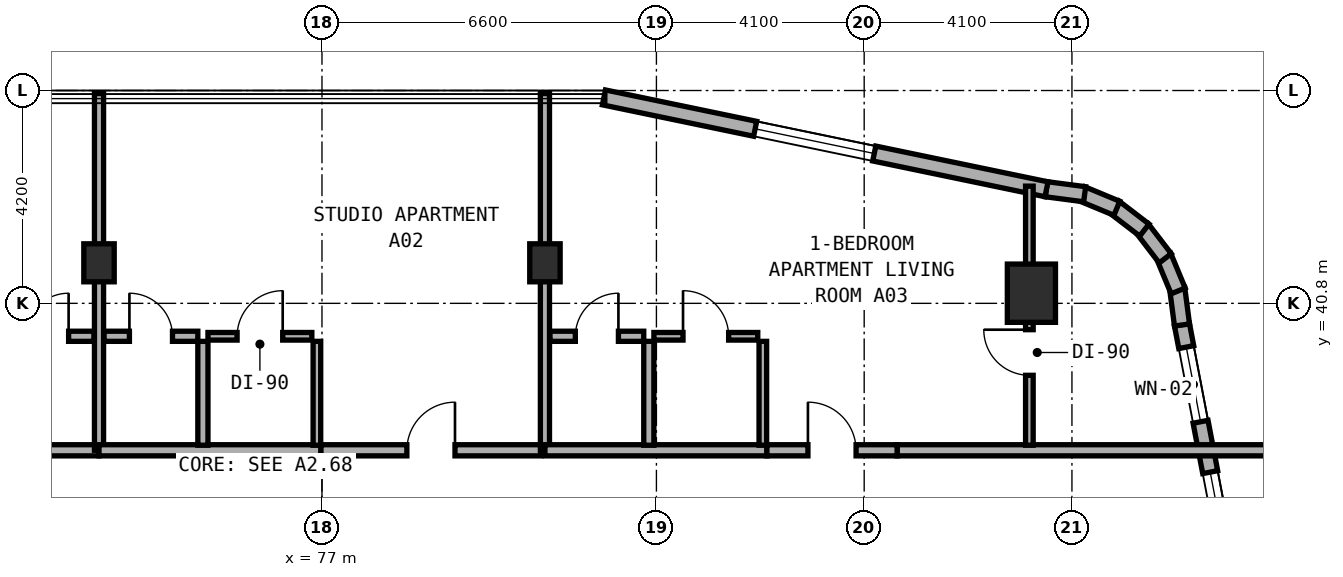
"""IFC4 building model, lengths in metres.
Left out: names, types, materials, properties, quantities, classifications, styles, units other than length and angle.
Written with IfcOpenShell. Run it as: python <this file> out.ifc"""

import sys

from ifc_helpers import new_model, si_unit, direction, frame, frame_2d, origin, origin_2d, place, context, subcontext, project, spatial, rectangle, extrude, element, fill, save


model = new_model("IFC4")
c1 = context("Model", 3, precision=1e-05, world=origin(), true_north=direction((0.0, 1.0)))
c2 = subcontext(c1, "Body", "Model", "MODEL_VIEW")
j1 = project(units=[si_unit("LENGTHUNIT", "METRE"), si_unit("PLANEANGLEUNIT", "RADIAN")], contexts=[c1])
p1 = place(None, origin())
s1 = spatial("IfcSite", under=j1, at=p1, CompositionType="ELEMENT")
p2 = place(p1, origin())
s2 = spatial("IfcBuilding", under=s1, at=p2, CompositionType="ELEMENT")
p3 = place(p2, frame((0.0, 0.0, 73.0)))
s3 = spatial("IfcBuildingStorey", under=s2, at=p3, CompositionType="ELEMENT", Elevation=73.0)
for number, where, z_axis, x_axis in (
    (1, (72.6, 41.6, 0.0), (0.0, 0.0, 1.0), (1.0, 0.0, 0.0)),
    (2, (81.4, 41.6, 0.0), (0.0, 0.0, 1.0), (1.0, 0.0, 0.0)),
):
    element("IfcColumn", number, at=place(p3, frame(where, z_axis=z_axis, x_axis=x_axis)), inside=s3, PredefinedType="COLUMN", context=c2, shape_type="SweptSolid", body=[
        extrude(rectangle(XDim=0.6, YDim=0.75, at=origin_2d()), origin(), (0.0, 0.0, 1.0), 3.5),
    ])
p4 = place(p3, frame((91.0, 41.0, 0.0), z_axis=(0.0, 0.0, 1.0), x_axis=(1.0, 0.0, 0.0)))
e3 = element("IfcColumn", 3, at=p4, inside=s3, PredefinedType="COLUMN", context=c2, shape_type="SweptSolid", body=[
    extrude(rectangle(XDim=0.95, YDim=1.15, at=origin_2d()), origin(), (0.0, 0.0, 1.0), 3.5),
])
p5 = place(p3, frame((95.783, 30.918, 0.0), z_axis=(0.0, 0.0, 1.0), x_axis=(-0.188087874316, 0.982152203854, 0.0)))
e4 = element("IfcWall", 4, at=p5, inside=s3, PredefinedType="STANDARD", context=c2, shape_type="SweptSolid", body=[
    extrude(rectangle(XDim=9.634, YDim=0.3, at=frame_2d((4.817, 0.0))), origin(), (0.0, 0.0, 1.0), 3.25),
])
p6 = place(p5, frame((1.897, 0.0, 0.8)))
e5 = element("IfcOpeningElement", 5, at=p6, cuts=e4, PredefinedType="OPENING", context=c2, shape_type="SweptSolid", body=[
    extrude(rectangle(XDim=2.4, YDim=1.6, at=frame_2d((1.2, 0.8))), frame((0.0, 0.16, 0.0), z_axis=(0.0, -1.0, 0.0), x_axis=(1.0, 0.0, 0.0)), (0.0, 0.0, 1.0), 0.32),
])
p7 = place(p5, frame((5.47, 0.0, 0.85)))
e6 = element("IfcOpeningElement", 6, at=p7, cuts=e4, PredefinedType="OPENING", context=c2, shape_type="SweptSolid", body=[
    extrude(rectangle(XDim=1.2, YDim=1.5, at=frame_2d((0.6, 0.75))), frame((0.0, 0.16, 0.0), z_axis=(0.0, -1.0, 0.0), x_axis=(1.0, 0.0, 0.0)), (0.0, 0.0, 1.0), 0.32),
])
p8 = place(p5, frame((7.682, 0.0, 0.85)))
e7 = element("IfcOpeningElement", 7, at=p8, cuts=e4, PredefinedType="OPENING", context=c2, shape_type="SweptSolid", body=[
    extrude(rectangle(XDim=1.5, YDim=1.5, at=frame_2d((0.75, 0.75))), frame((0.0, 0.16, 0.0), z_axis=(0.0, -1.0, 0.0), x_axis=(1.0, 0.0, 0.0)), (0.0, 0.0, 1.0), 0.32),
])
p9 = place(p3, frame((93.972, 40.373, 0.0), z_axis=(0.0, 0.0, 1.0), x_axis=(-0.130255288807, 0.991480488834, 0.0)))
e8 = element("IfcWall", 8, at=p9, inside=s3, PredefinedType="STANDARD", context=c2, shape_type="SweptSolid", body=[
    extrude(rectangle(XDim=0.729, YDim=0.3, at=frame_2d((0.365, 0.0))), origin(), (0.0, 0.0, 1.0), 3.25),
])
p10 = place(p3, frame((93.896, 41.045, 0.0), z_axis=(0.0, 0.0, 1.0), x_axis=(-0.383267045233, 0.923637576129, 0.0)))
e9 = element("IfcWall", 9, at=p10, inside=s3, PredefinedType="STANDARD", context=c2, shape_type="SweptSolid", body=[
    extrude(rectangle(XDim=0.746, YDim=0.3, at=frame_2d((0.373, 0.0))), origin(), (0.0, 0.0, 1.0), 3.25),
])
for number, where, z_axis, x_axis in (
    (10, (93.641, 41.689, 0.0), (0.0, 0.0, 1.0), (-0.609, 0.793, 0.0)),
    (11, (93.229, 42.246, 0.0), (0.0, 0.0, 1.0), (-0.794, 0.608, 0.0)),
):
    element("IfcWall", number, at=place(p3, frame(where, z_axis=z_axis, x_axis=x_axis)), inside=s3, PredefinedType="STANDARD", context=c2, shape_type="SweptSolid", body=[
        extrude(rectangle(XDim=0.746, YDim=0.3, at=frame_2d((0.373, 0.0))), origin(), (0.0, 0.0, 1.0), 3.25),
    ])
p11 = place(p3, frame((92.686, 42.676, 0.0), z_axis=(0.0, 0.0, 1.0), x_axis=(-0.923637576129, 0.383267045233, 0.0)))
e12 = element("IfcWall", 12, at=p11, inside=s3, PredefinedType="STANDARD", context=c2, shape_type="SweptSolid", body=[
    extrude(rectangle(XDim=0.746, YDim=0.3, at=frame_2d((0.373, 0.0))), origin(), (0.0, 0.0, 1.0), 3.25),
])
p12 = place(p3, frame((92.051, 42.953, 0.0), z_axis=(0.0, 0.0, 1.0), x_axis=(-0.991559404866, 0.129653178221, 0.0)))
e13 = element("IfcWall", 13, at=p12, inside=s3, PredefinedType="STANDARD", context=c2, shape_type="SweptSolid", body=[
    extrude(rectangle(XDim=0.764, YDim=0.3, at=frame_2d((0.382, 0.0))), origin(), (0.0, 0.0, 1.0), 3.25),
])
p13 = place(p3, frame((91.298, 43.051, 0.0), z_axis=(0.0, 0.0, 1.0), x_axis=(-0.979128391325, 0.203242695569, 0.0)))
e14 = element("IfcWall", 14, at=p13, inside=s3, PredefinedType="STANDARD", context=c2, shape_type="SweptSolid", body=[
    extrude(rectangle(XDim=8.92, YDim=0.3, at=frame_2d((4.46, 0.0))), origin(), (0.0, 0.0, 1.0), 3.25),
])
p14 = place(p13, frame((3.472, 0.0, 0.8)))
e15 = element("IfcOpeningElement", 15, at=p14, cuts=e14, PredefinedType="OPENING", context=c2, shape_type="SweptSolid", body=[
    extrude(rectangle(XDim=2.4, YDim=1.6, at=frame_2d((1.2, 0.8))), frame((0.0, 0.16, 0.0), z_axis=(0.0, -1.0, 0.0), x_axis=(1.0, 0.0, 0.0)), (0.0, 0.0, 1.0), 0.32),
])
p15 = place(p3, frame((68.22, 37.9, 0.0), z_axis=(0.0, 0.0, 1.0), x_axis=(1.0, 0.0, 0.0)))
e16 = element("IfcWall", 16, at=p15, inside=s3, PredefinedType="SOLIDWALL", context=c2, shape_type="SweptSolid", body=[
    extrude(rectangle(XDim=4.38, YDim=0.22, at=frame_2d((2.19, 0.0))), origin(), (0.0, 0.0, 1.0), 2.725),
])
p16 = place(p3, frame((70.65, 40.15, 0.0), z_axis=(0.0, 0.0, 1.0), x_axis=(1.0, 0.0, 0.0)))
e17 = element("IfcWall", 17, at=p16, inside=s3, PredefinedType="PLUMBINGWALL", context=c2, shape_type="SweptSolid", body=[
    extrude(rectangle(XDim=1.85, YDim=0.2, at=frame_2d((0.925, 0.0))), origin(), (0.0, 0.0, 1.0), 3.22),
])
p17 = place(p16, frame((0.5, 0.0, 0.0)))
e18 = element("IfcOpeningElement", 18, at=p17, cuts=e17, PredefinedType="OPENING", context=c2, shape_type="SweptSolid", body=[
    extrude(rectangle(XDim=0.85, YDim=2.1, at=frame_2d((0.425, 1.05))), frame((0.0, 0.11, 0.0), z_axis=(0.0, -1.0, 0.0), x_axis=(1.0, 0.0, 0.0)), (0.0, 0.0, 1.0), 0.22),
])
p18 = place(p3, frame((72.6, 37.9, 0.0), z_axis=(0.0, 0.0, 1.0), x_axis=(0.0, 1.0, 0.0)))
e19 = element("IfcWall", 19, at=p18, inside=s3, PredefinedType="SOLIDWALL", context=c2, shape_type="SweptSolid", body=[
    extrude(rectangle(XDim=7.04, YDim=0.18, at=frame_2d((3.52, 0.0))), origin(), (0.0, 0.0, 1.0), 2.725),
])
p19 = place(p3, frame((72.6, 37.9, 0.0), z_axis=(0.0, 0.0, 1.0), x_axis=(1.0, 0.0, 0.0)))
e20 = element("IfcWall", 20, at=p19, inside=s3, PredefinedType="SOLIDWALL", context=c2, shape_type="SweptSolid", body=[
    extrude(rectangle(XDim=4.38, YDim=0.22, at=frame_2d((2.19, 0.0))), origin(), (0.0, 0.0, 1.0), 2.725),
])
p20 = place(p3, frame((76.98, 37.9, 0.0), z_axis=(0.0, 0.0, 1.0), x_axis=(1.0, 0.0, 0.0)))
e21 = element("IfcWall", 21, at=p20, inside=s3, PredefinedType="SOLIDWALL", context=c2, shape_type="SweptSolid", body=[
    extrude(rectangle(XDim=4.34, YDim=0.22, at=frame_2d((2.17, 0.0))), origin(), (0.0, 0.0, 1.0), 2.725),
])
p21 = place(p20, frame((1.695, 0.0, 0.0)))
e22 = element("IfcOpeningElement", 22, at=p21, cuts=e21, PredefinedType="OPENING", context=c2, shape_type="SweptSolid", body=[
    extrude(rectangle(XDim=0.95, YDim=2.1, at=frame_2d((0.475, 1.05))), frame((0.0, 0.12, 0.0), z_axis=(0.0, -1.0, 0.0), x_axis=(1.0, 0.0, 0.0)), (0.0, 0.0, 1.0), 0.24),
])
p22 = place(p3, frame((74.65, 38.0, 0.0), z_axis=(0.0, 0.0, 1.0), x_axis=(0.0, 1.0, 0.0)))
e23 = element("IfcWall", 23, at=p22, inside=s3, PredefinedType="PLUMBINGWALL", context=c2, shape_type="SweptSolid", body=[
    extrude(rectangle(XDim=2.05, YDim=0.2, at=frame_2d((1.025, 0.0))), origin(), (0.0, 0.0, 1.0), 2.985),
])
p23 = place(p3, frame((76.9, 38.0, 0.0), z_axis=(0.0, 0.0, 1.0), x_axis=(0.0, 1.0, 0.0)))
e24 = element("IfcWall", 24, at=p23, inside=s3, PredefinedType="PARTITIONING", context=c2, shape_type="SweptSolid", body=[
    extrude(rectangle(XDim=2.05, YDim=0.15, at=frame_2d((1.025, 0.0))), origin(), (0.0, 0.0, 1.0), 2.985),
])
p24 = place(p3, frame((72.7, 40.15, 0.0), z_axis=(0.0, 0.0, 1.0), x_axis=(1.0, 0.0, 0.0)))
e25 = element("IfcWall", 25, at=p24, inside=s3, PredefinedType="PLUMBINGWALL", context=c2, shape_type="SweptSolid", body=[
    extrude(rectangle(XDim=1.85, YDim=0.2, at=frame_2d((0.925, 0.0))), origin(), (0.0, 0.0, 1.0), 3.22),
])
p25 = place(p24, frame((0.5, 0.0, 0.0)))
e26 = element("IfcOpeningElement", 26, at=p25, cuts=e25, PredefinedType="OPENING", context=c2, shape_type="SweptSolid", body=[
    extrude(rectangle(XDim=0.85, YDim=2.1, at=frame_2d((0.425, 1.05))), frame((0.0, 0.11, 0.0), z_axis=(0.0, -1.0, 0.0), x_axis=(1.0, 0.0, 0.0)), (0.0, 0.0, 1.0), 0.22),
])
p26 = place(p3, frame((74.75, 40.15, 0.0), z_axis=(0.0, 0.0, 1.0), x_axis=(1.0, 0.0, 0.0)))
e27 = element("IfcWall", 27, at=p26, inside=s3, PredefinedType="PARTITIONING", context=c2, shape_type="SweptSolid", body=[
    extrude(rectangle(XDim=2.05, YDim=0.15, at=frame_2d((1.025, 0.0))), origin(), (0.0, 0.0, 1.0), 3.22),
])
p27 = place(p26, frame((0.575, 0.0, 0.0)))
e28 = element("IfcOpeningElement", 28, at=p27, cuts=e27, PredefinedType="OPENING", context=c2, shape_type="SweptSolid", body=[
    extrude(rectangle(XDim=0.9, YDim=2.1, at=frame_2d((0.45, 1.05))), frame((0.0, 0.085, 0.0), z_axis=(0.0, -1.0, 0.0), x_axis=(1.0, 0.0, 0.0)), (0.0, 0.0, 1.0), 0.17),
])
p28 = place(p3, frame((81.4, 37.9, 0.0), z_axis=(0.0, 0.0, 1.0), x_axis=(0.0, 1.0, 0.0)))
e29 = element("IfcWall", 29, at=p28, inside=s3, PredefinedType="SOLIDWALL", context=c2, shape_type="SweptSolid", body=[
    extrude(rectangle(XDim=7.04, YDim=0.18, at=frame_2d((3.52, 0.0))), origin(), (0.0, 0.0, 1.0), 2.725),
])
p29 = place(p3, frame((81.4, 37.9, 0.0), z_axis=(0.0, 0.0, 1.0), x_axis=(1.0, 0.0, 0.0)))
e30 = element("IfcWall", 30, at=p29, inside=s3, PredefinedType="SOLIDWALL", context=c2, shape_type="SweptSolid", body=[
    extrude(rectangle(XDim=4.38, YDim=0.22, at=frame_2d((2.19, 0.0))), origin(), (0.0, 0.0, 1.0), 2.725),
])
p30 = place(p3, frame((88.35, 37.9, 0.0), z_axis=(0.0, 0.0, 1.0), x_axis=(1.0, 0.0, 0.0)))
e31 = element("IfcWall", 31, at=p30, inside=s3, PredefinedType="SOLIDWALL", context=c2, shape_type="SweptSolid", body=[
    extrude(rectangle(XDim=7.41, YDim=0.22, at=frame_2d((3.705, 0.0))), origin(), (0.0, 0.0, 1.0), 2.865),
])
p31 = place(p3, frame((85.78, 37.9, 0.0), z_axis=(0.0, 0.0, 1.0), x_axis=(1.0, 0.0, 0.0)))
e32 = element("IfcWall", 32, at=p31, inside=s3, PredefinedType="SOLIDWALL", context=c2, shape_type="SweptSolid", body=[
    extrude(rectangle(XDim=2.57, YDim=0.22, at=frame_2d((1.285, 0.0))), origin(), (0.0, 0.0, 1.0), 3.22),
])
p32 = place(p31, frame((0.81, 0.0, 0.0)))
e33 = element("IfcOpeningElement", 33, at=p32, cuts=e32, PredefinedType="OPENING", context=c2, shape_type="SweptSolid", body=[
    extrude(rectangle(XDim=0.95, YDim=2.1, at=frame_2d((0.475, 1.05))), frame((0.0, 0.12, 0.0), z_axis=(0.0, -1.0, 0.0), x_axis=(1.0, 0.0, 0.0)), (0.0, 0.0, 1.0), 0.24),
])
p33 = place(p3, frame((90.96, 38.0, 0.0), z_axis=(0.0, 0.0, 1.0), x_axis=(0.0, 1.0, 0.0)))
e34 = element("IfcWall", 34, at=p33, inside=s3, PredefinedType="PARTITIONING", context=c2, shape_type="SweptSolid", body=[
    extrude(rectangle(XDim=5.113, YDim=0.15, at=frame_2d((2.557, 0.0))), origin(), (0.0, 0.0, 1.0), 2.865),
])
p34 = place(p33, frame((1.38, 0.0, 0.0)))
e35 = element("IfcOpeningElement", 35, at=p34, cuts=e34, PredefinedType="OPENING", context=c2, shape_type="SweptSolid", body=[
    extrude(rectangle(XDim=0.9, YDim=2.1, at=frame_2d((0.45, 1.05))), frame((0.0, 0.085, 0.0), z_axis=(0.0, -1.0, 0.0), x_axis=(1.0, 0.0, 0.0)), (0.0, 0.0, 1.0), 0.17),
])
p35 = place(p3, frame((83.45, 38.0, 0.0), z_axis=(0.0, 0.0, 1.0), x_axis=(0.0, 1.0, 0.0)))
e36 = element("IfcWall", 36, at=p35, inside=s3, PredefinedType="PLUMBINGWALL", context=c2, shape_type="SweptSolid", body=[
    extrude(rectangle(XDim=2.05, YDim=0.2, at=frame_2d((1.025, 0.0))), origin(), (0.0, 0.0, 1.0), 3.22),
])
p36 = place(p3, frame((85.7, 38.0, 0.0), z_axis=(0.0, 0.0, 1.0), x_axis=(0.0, 1.0, 0.0)))
e37 = element("IfcWall", 37, at=p36, inside=s3, PredefinedType="PARTITIONING", context=c2, shape_type="SweptSolid", body=[
    extrude(rectangle(XDim=2.05, YDim=0.15, at=frame_2d((1.025, 0.0))), origin(), (0.0, 0.0, 1.0), 3.22),
])
p37 = place(p3, frame((81.5, 40.15, 0.0), z_axis=(0.0, 0.0, 1.0), x_axis=(1.0, 0.0, 0.0)))
e38 = element("IfcWall", 38, at=p37, inside=s3, PredefinedType="PLUMBINGWALL", context=c2, shape_type="SweptSolid", body=[
    extrude(rectangle(XDim=1.85, YDim=0.2, at=frame_2d((0.925, 0.0))), origin(), (0.0, 0.0, 1.0), 2.725),
])
p38 = place(p37, frame((0.5, 0.0, 0.0)))
e39 = element("IfcOpeningElement", 39, at=p38, cuts=e38, PredefinedType="OPENING", context=c2, shape_type="SweptSolid", body=[
    extrude(rectangle(XDim=0.85, YDim=2.1, at=frame_2d((0.425, 1.05))), frame((0.0, 0.11, 0.0), z_axis=(0.0, -1.0, 0.0), x_axis=(1.0, 0.0, 0.0)), (0.0, 0.0, 1.0), 0.22),
])
p39 = place(p3, frame((83.55, 40.15, 0.0), z_axis=(0.0, 0.0, 1.0), x_axis=(1.0, 0.0, 0.0)))
e40 = element("IfcWall", 40, at=p39, inside=s3, PredefinedType="PARTITIONING", context=c2, shape_type="SweptSolid", body=[
    extrude(rectangle(XDim=2.05, YDim=0.15, at=frame_2d((1.025, 0.0))), origin(), (0.0, 0.0, 1.0), 3.22),
])
p40 = place(p39, frame((0.575, 0.0, 0.0)))
e41 = element("IfcOpeningElement", 41, at=p40, cuts=e40, PredefinedType="OPENING", context=c2, shape_type="SweptSolid", body=[
    extrude(rectangle(XDim=0.9, YDim=2.1, at=frame_2d((0.45, 1.05))), frame((0.0, 0.085, 0.0), z_axis=(0.0, -1.0, 0.0), x_axis=(1.0, 0.0, 0.0)), (0.0, 0.0, 1.0), 0.17),
])
p41 = place(p7, origin())
e42 = element("IfcWindow", 42, at=p41, inside=s3, PartitioningType="SINGLE_PANEL", PredefinedType="WINDOW", context=c2, shape_type="SweptSolid", body=[
    extrude(rectangle(XDim=1.2, YDim=1.5, at=frame_2d((0.6, 0.75))), frame((0.0, 0.03, 0.0), z_axis=(0.0, -1.0, 0.0), x_axis=(1.0, 0.0, 0.0)), (0.0, 0.0, 1.0), 0.06),
])
fill(e6, e42)
p42 = place(p8, origin())
e43 = element("IfcWindow", 43, at=p42, inside=s3, PartitioningType="SINGLE_PANEL", PredefinedType="WINDOW", context=c2, shape_type="SweptSolid", body=[
    extrude(rectangle(XDim=1.5, YDim=1.5, at=frame_2d((0.75, 0.75))), frame((0.0, 0.03, 0.0), z_axis=(0.0, -1.0, 0.0), x_axis=(1.0, 0.0, 0.0)), (0.0, 0.0, 1.0), 0.06),
])
fill(e7, e43)
p43 = place(p14, origin())
e44 = element("IfcWindow", 44, at=p43, inside=s3, PartitioningType="SINGLE_PANEL", PredefinedType="WINDOW", context=c2, shape_type="SweptSolid", body=[
    extrude(rectangle(XDim=2.4, YDim=1.6, at=frame_2d((1.2, 0.8))), frame((0.0, 0.03, 0.0), z_axis=(0.0, -1.0, 0.0), x_axis=(1.0, 0.0, 0.0)), (0.0, 0.0, 1.0), 0.06),
])
fill(e15, e44)
p44 = place(p17, origin())
e45 = element("IfcDoor", 45, at=p44, inside=s3, OperationType="SINGLE_SWING_RIGHT", PredefinedType="DOOR", context=c2, shape_type="SweptSolid", body=[
    extrude(rectangle(XDim=0.85, YDim=2.1, at=frame_2d((0.425, 1.05))), frame((0.0, 0.025, 0.0), z_axis=(0.0, -1.0, 0.0), x_axis=(1.0, 0.0, 0.0)), (0.0, 0.0, 1.0), 0.05),
])
fill(e18, e45)
p45 = place(p21, origin())
e46 = element("IfcDoor", 46, at=p45, inside=s3, OperationType="SINGLE_SWING_RIGHT", PredefinedType="DOOR", context=c2, shape_type="SweptSolid", body=[
    extrude(rectangle(XDim=0.95, YDim=2.1, at=frame_2d((0.475, 1.05))), frame((0.0, 0.025, 0.0), z_axis=(0.0, -1.0, 0.0), x_axis=(1.0, 0.0, 0.0)), (0.0, 0.0, 1.0), 0.05),
])
fill(e22, e46)
p46 = place(p25, origin())
e47 = element("IfcDoor", 47, at=p46, inside=s3, OperationType="SINGLE_SWING_LEFT", PredefinedType="DOOR", context=c2, shape_type="SweptSolid", body=[
    extrude(rectangle(XDim=0.85, YDim=2.1, at=frame_2d((0.425, 1.05))), frame((0.0, 0.025, 0.0), z_axis=(0.0, -1.0, 0.0), x_axis=(1.0, 0.0, 0.0)), (0.0, 0.0, 1.0), 0.05),
])
fill(e26, e47)
p47 = place(p27, origin())
e48 = element("IfcDoor", 48, at=p47, inside=s3, OperationType="SINGLE_SWING_RIGHT", PredefinedType="DOOR", context=c2, shape_type="SweptSolid", body=[
    extrude(rectangle(XDim=0.9, YDim=2.1, at=frame_2d((0.45, 1.05))), frame((0.0, 0.025, 0.0), z_axis=(0.0, -1.0, 0.0), x_axis=(1.0, 0.0, 0.0)), (0.0, 0.0, 1.0), 0.05),
])
fill(e28, e48)
p48 = place(p32, origin())
e49 = element("IfcDoor", 49, at=p48, inside=s3, OperationType="SINGLE_SWING_LEFT", PredefinedType="DOOR", context=c2, shape_type="SweptSolid", body=[
    extrude(rectangle(XDim=0.95, YDim=2.1, at=frame_2d((0.475, 1.05))), frame((0.0, 0.025, 0.0), z_axis=(0.0, -1.0, 0.0), x_axis=(1.0, 0.0, 0.0)), (0.0, 0.0, 1.0), 0.05),
])
fill(e33, e49)
p49 = place(p34, origin())
e50 = element("IfcDoor", 50, at=p49, inside=s3, OperationType="SINGLE_SWING_RIGHT", PredefinedType="DOOR", context=c2, shape_type="SweptSolid", body=[
    extrude(rectangle(XDim=0.9, YDim=2.1, at=frame_2d((0.45, 1.05))), frame((0.0, 0.025, 0.0), z_axis=(0.0, -1.0, 0.0), x_axis=(1.0, 0.0, 0.0)), (0.0, 0.0, 1.0), 0.05),
])
fill(e35, e50)
p50 = place(p38, origin())
e51 = element("IfcDoor", 51, at=p50, inside=s3, OperationType="SINGLE_SWING_RIGHT", PredefinedType="DOOR", context=c2, shape_type="SweptSolid", body=[
    extrude(rectangle(XDim=0.85, YDim=2.1, at=frame_2d((0.425, 1.05))), frame((0.0, 0.025, 0.0), z_axis=(0.0, -1.0, 0.0), x_axis=(1.0, 0.0, 0.0)), (0.0, 0.0, 1.0), 0.05),
])
fill(e39, e51)
p51 = place(p40, origin())
e52 = element("IfcDoor", 52, at=p51, inside=s3, OperationType="SINGLE_SWING_LEFT", PredefinedType="DOOR", context=c2, shape_type="SweptSolid", body=[
    extrude(rectangle(XDim=0.9, YDim=2.1, at=frame_2d((0.45, 1.05))), frame((0.0, 0.025, 0.0), z_axis=(0.0, -1.0, 0.0), x_axis=(1.0, 0.0, 0.0)), (0.0, 0.0, 1.0), 0.05),
])
fill(e41, e52)
save(model, sys.argv[1])
